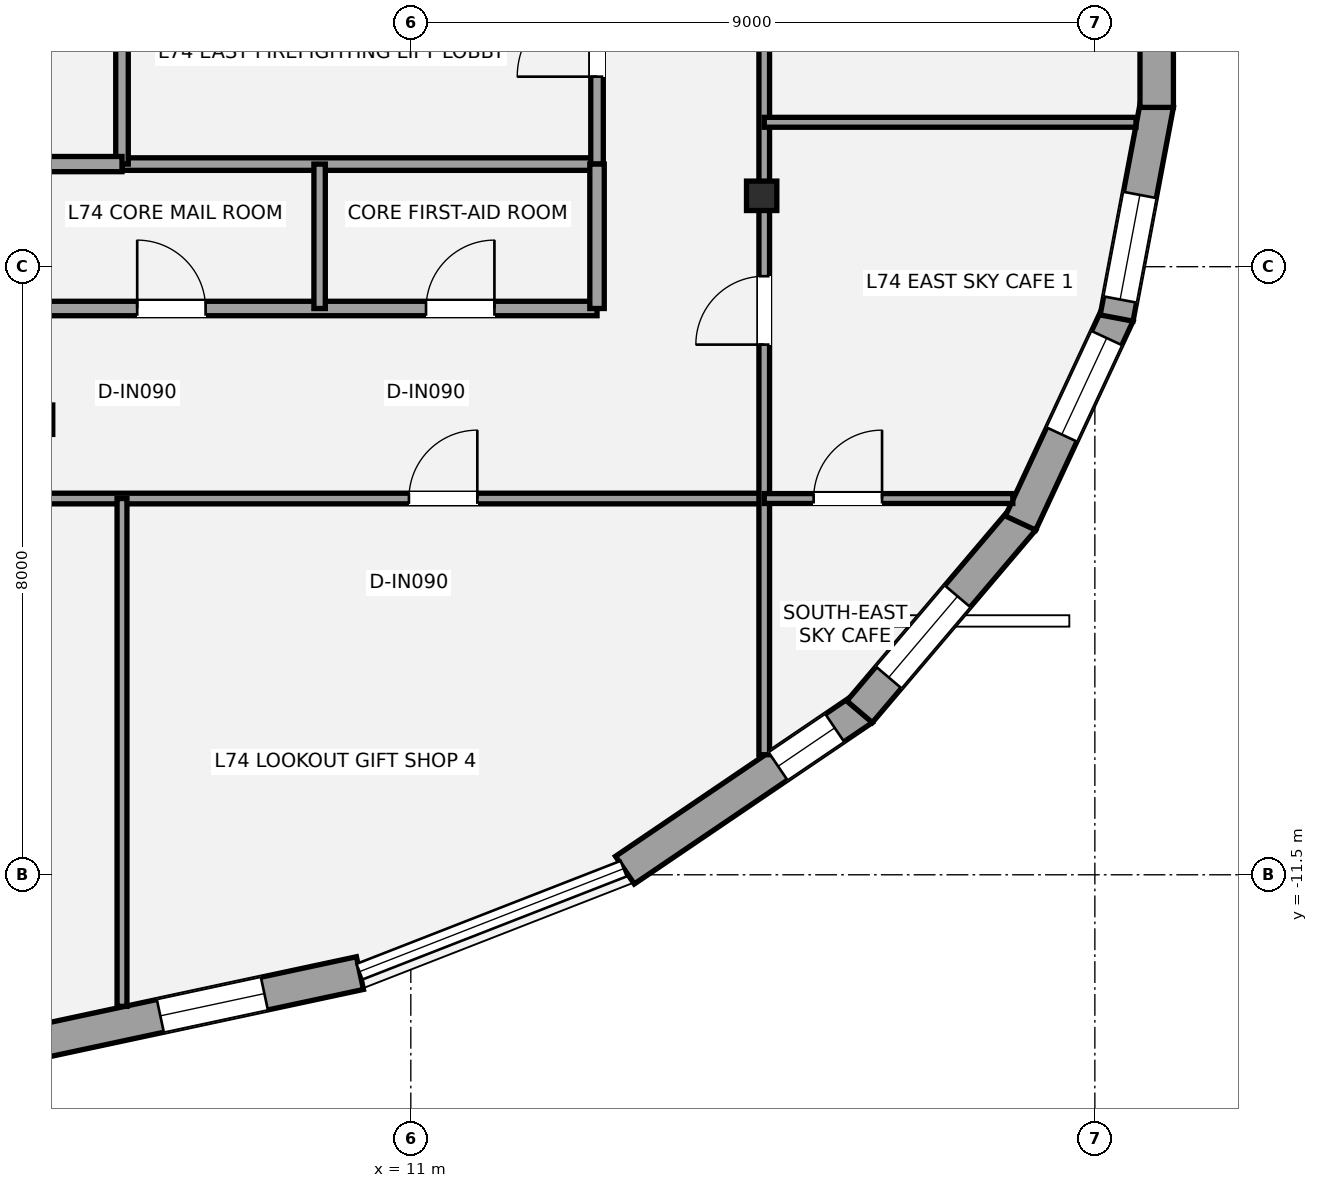
"""IFC4 building model, lengths in metres.
Left out: names, types, materials, properties, quantities, classifications, styles, units other than length and angle.
Written with IfcOpenShell. Run it as: python <this file> out.ifc"""

import sys

from ifc_helpers import new_model, si_unit, direction, frame, frame_2d, origin, origin_2d, place, context, subcontext, project, spatial, rectangle, i_section, extrude, element, fill, save


model = new_model("IFC4")
c1 = context("Model", 3, precision=1e-05, world=origin(), true_north=direction((0.0, 1.0)))
c2 = subcontext(c1, "Body", "Model", "MODEL_VIEW")
j1 = project(units=[si_unit("LENGTHUNIT", "METRE"), si_unit("PLANEANGLEUNIT", "RADIAN")], contexts=[c1])
p1 = place(None, origin())
s1 = spatial("IfcSite", under=j1, at=p1, CompositionType="ELEMENT")
p2 = place(p1, origin())
s2 = spatial("IfcBuilding", under=s1, at=p2, CompositionType="ELEMENT")
p3 = place(p2, frame((0.0, 0.0, 260.4)))
s3 = spatial("IfcBuildingStorey", under=s2, at=p3, CompositionType="ELEMENT", Elevation=260.4)
for number, where, z_axis, x_axis in (
    (1, (6.09, -5.513, 0.0), (0.0, 0.0, 1.0), (1.0, 0.0, 0.0)),
    (2, (15.616, -2.567, 0.0), (0.0, 0.0, 1.0), (1.0, 0.0, 0.0)),
):
    element("IfcColumn", number, at=place(p3, frame(where, z_axis=z_axis, x_axis=x_axis)), inside=s3, PredefinedType="COLUMN", context=c2, shape_type="SweptSolid", body=[
        extrude(i_section(OverallWidth=0.399, OverallDepth=0.387, WebThickness=0.021, FlangeThickness=0.033, at=origin_2d()), origin(), (0.0, 0.0, 1.0), 4.4),
    ])
p4 = place(p3, frame((10.331, -12.794, 0.0), z_axis=(0.0, 0.0, 1.0), x_axis=(-0.977823681193, -0.209429817596, 0.0)))
e3 = element("IfcWall", 3, at=p4, inside=s3, PredefinedType="STANDARD", context=c2, shape_type="SweptSolid", body=[
    extrude(rectangle(XDim=4.367, YDim=0.44, at=frame_2d((2.184, 0.0))), origin(), (0.0, 0.0, 1.0), 3.546),
])
p5 = place(p4, frame((1.286, 0.0, 0.6)))
e4 = element("IfcOpeningElement", 4, at=p5, cuts=e3, PredefinedType="OPENING", context=c2, shape_type="SweptSolid", body=[
    extrude(rectangle(XDim=1.4, YDim=1.55, at=frame_2d((0.7, 0.775))), frame((0.0, 0.23, 0.0), z_axis=(0.0, -1.0, 0.0), x_axis=(1.0, 0.0, 0.0)), (0.0, 0.0, 1.0), 0.46),
])
p6 = place(p3, frame((16.948, -9.316, 0.0), z_axis=(0.0, 0.0, 1.0), x_axis=(-0.827716626187, -0.561146314908, 0.0)))
e5 = element("IfcWall", 5, at=p6, inside=s3, PredefinedType="STANDARD", context=c2, shape_type="SweptSolid", body=[
    extrude(rectangle(XDim=3.783, YDim=0.44, at=frame_2d((1.892, 0.0))), origin(), (0.0, 0.0, 1.0), 3.55),
])
p7 = place(p6, frame((0.448, 0.0, 0.58)))
e6 = element("IfcOpeningElement", 6, at=p7, cuts=e5, PredefinedType="OPENING", context=c2, shape_type="SweptSolid", body=[
    extrude(rectangle(XDim=0.9, YDim=1.35, at=frame_2d((0.45, 0.675))), frame((0.0, 0.23, 0.0), z_axis=(0.0, -1.0, 0.0), x_axis=(1.0, 0.0, 0.0)), (0.0, 0.0, 1.0), 0.46),
])
p8 = place(p3, frame((19.054, -6.823, 0.0), z_axis=(0.0, 0.0, 1.0), x_axis=(-0.647061604266, -0.762437722233, 0.0)))
e7 = element("IfcWall", 7, at=p8, inside=s3, PredefinedType="STANDARD", context=c2, shape_type="SweptSolid", body=[
    extrude(rectangle(XDim=3.322, YDim=0.44, at=frame_2d((1.661, 0.0))), origin(), (0.0, 0.0, 1.0), 3.546),
])
p9 = place(p8, frame((1.329, 0.0, 0.58)))
e8 = element("IfcOpeningElement", 8, at=p9, cuts=e7, PredefinedType="OPENING", context=c2, shape_type="SweptSolid", body=[
    extrude(rectangle(XDim=1.4, YDim=1.55, at=frame_2d((0.7, 0.775))), frame((0.0, 0.23, 0.0), z_axis=(0.0, -1.0, 0.0), x_axis=(1.0, 0.0, 0.0)), (0.0, 0.0, 1.0), 0.46),
])
p10 = place(p3, frame((20.303, -4.123, 0.0), z_axis=(0.0, 0.0, 1.0), x_axis=(-0.422378607623, -0.906419501016, 0.0)))
e9 = element("IfcWall", 9, at=p10, inside=s3, PredefinedType="STANDARD", context=c2, shape_type="SweptSolid", body=[
    extrude(rectangle(XDim=3.033, YDim=0.44, at=frame_2d((1.517, 0.0))), origin(), (0.0, 0.0, 1.0), 3.546),
])
p11 = place(p10, frame((0.348, 0.0, 0.58)))
e10 = element("IfcOpeningElement", 10, at=p11, cuts=e9, PredefinedType="OPENING", context=c2, shape_type="SweptSolid", body=[
    extrude(rectangle(XDim=1.4, YDim=1.55, at=frame_2d((0.7, 0.775))), frame((0.0, 0.23, 0.0), z_axis=(0.0, -1.0, 0.0), x_axis=(1.0, 0.0, 0.0)), (0.0, 0.0, 1.0), 0.46),
])
p12 = place(p3, frame((20.817, -1.364, 0.0), z_axis=(0.0, 0.0, 1.0), x_axis=(-0.185555519657, -0.982633781795, 0.0)))
e11 = element("IfcWall", 11, at=p12, inside=s3, PredefinedType="STANDARD", context=c2, shape_type="SweptSolid", body=[
    extrude(rectangle(XDim=2.862, YDim=0.44, at=frame_2d((1.431, 0.0))), origin(), (0.0, 0.0, 1.0), 3.546),
])
p13 = place(p12, frame((1.213, 0.0, 0.6)))
e12 = element("IfcOpeningElement", 12, at=p13, cuts=e11, PredefinedType="OPENING", context=c2, shape_type="SweptSolid", body=[
    extrude(rectangle(XDim=1.4, YDim=1.55, at=frame_2d((0.7, 0.775))), frame((0.0, 0.23, 0.0), z_axis=(0.0, -1.0, 0.0), x_axis=(1.0, 0.0, 0.0)), (0.0, 0.0, 1.0), 0.46),
])
p14 = place(p3, frame((20.814, 1.404, 0.0), z_axis=(0.0, 0.0, 1.0), x_axis=(0.0, -1.0, 0.0)))
e13 = element("IfcWall", 13, at=p14, inside=s3, PredefinedType="STANDARD", context=c2, shape_type="SweptSolid", body=[
    extrude(rectangle(XDim=2.809, YDim=0.44, at=frame_2d((1.404, 0.0))), origin(), (0.0, 0.0, 1.0), 3.546),
])
p15 = place(p14, frame((0.2, 0.0, 0.58)))
e14 = element("IfcOpeningElement", 14, at=p15, cuts=e13, PredefinedType="OPENING", context=c2, shape_type="SweptSolid", body=[
    extrude(rectangle(XDim=1.4, YDim=1.55, at=frame_2d((0.7, 0.775))), frame((0.0, 0.23, 0.0), z_axis=(0.0, -1.0, 0.0), x_axis=(1.0, 0.0, 0.0)), (0.0, 0.0, 1.0), 0.46),
])
p16 = place(p3, frame((7.2, -2.15, 0.0), z_axis=(0.0, 0.0, 1.0), x_axis=(1.0, 0.0, 0.0)))
e15 = element("IfcWall", 15, at=p16, inside=s3, PredefinedType="PARTITIONING", context=c2, shape_type="SweptSolid", body=[
    extrude(rectangle(XDim=6.25, YDim=0.165, at=frame_2d((3.125, 0.0))), origin(), (0.0, 0.0, 1.0), 2.37),
])
p17 = place(p3, frame((7.2, -2.15, 0.0), z_axis=(0.0, 0.0, 1.0), x_axis=(0.0, 1.0, 0.0)))
e16 = element("IfcWall", 16, at=p17, inside=s3, PredefinedType="PARTITIONING", context=c2, shape_type="SweptSolid", body=[
    extrude(rectangle(XDim=3.5, YDim=0.165, at=frame_2d((1.75, 0.0))), origin(), (0.0, 0.0, 1.0), 2.37),
])
p18 = place(p3, frame((13.45, -2.15, 0.0), z_axis=(0.0, 0.0, 1.0), x_axis=(0.0, 1.0, 0.0)))
e17 = element("IfcWall", 17, at=p18, inside=s3, PredefinedType="PARTITIONING", context=c2, shape_type="SweptSolid", body=[
    extrude(rectangle(XDim=3.5, YDim=0.165, at=frame_2d((1.75, 0.0))), origin(), (0.0, 0.0, 1.0), 2.37),
])
p19 = place(p18, frame((1.15, 0.0, 0.0)))
e18 = element("IfcOpeningElement", 18, at=p19, cuts=e17, PredefinedType="OPENING", context=c2, shape_type="SweptSolid", body=[
    extrude(rectangle(XDim=1.05, YDim=2.15, at=frame_2d((0.525, 1.075))), frame((0.0, 0.093, 0.0), z_axis=(0.0, -1.0, 0.0), x_axis=(1.0, 0.0, 0.0)), (0.0, 0.0, 1.0), 0.185),
])
p20 = place(p3, frame((4.95, -2.15, 0.0), z_axis=(0.0, 0.0, 1.0), x_axis=(1.0, 0.0, 0.0)))
e19 = element("IfcWall", 19, at=p20, inside=s3, PredefinedType="SOLIDWALL", context=c2, shape_type="SweptSolid", body=[
    extrude(rectangle(XDim=2.25, YDim=0.2, at=frame_2d((1.125, 0.0))), origin(), (0.0, 0.0, 1.0), 2.37),
])
p21 = place(p3, frame((2.1, -4.05, 0.0), z_axis=(0.0, 0.0, 1.0), x_axis=(1.0, 0.0, 0.0)))
e20 = element("IfcWall", 20, at=p21, inside=s3, PredefinedType="PLUMBINGWALL", context=c2, shape_type="SweptSolid", body=[
    extrude(rectangle(XDim=11.35, YDim=0.19, at=frame_2d((5.675, 0.0))), origin(), (0.0, 0.0, 1.0), 2.37),
])
p22 = place(p21, frame((1.4, 0.0, 0.0)))
e21 = element("IfcOpeningElement", 21, at=p22, cuts=e20, PredefinedType="OPENING", context=c2, shape_type="SweptSolid", body=[
    extrude(rectangle(XDim=0.9, YDim=2.1, at=frame_2d((0.45, 1.05))), frame((0.0, 0.105, 0.0), z_axis=(0.0, -1.0, 0.0), x_axis=(1.0, 0.0, 0.0)), (0.0, 0.0, 1.0), 0.21),
])
p23 = place(p21, frame((5.3, 0.0, 0.0)))
e22 = element("IfcOpeningElement", 22, at=p23, cuts=e20, PredefinedType="OPENING", context=c2, shape_type="SweptSolid", body=[
    extrude(rectangle(XDim=0.9, YDim=2.1, at=frame_2d((0.45, 1.05))), frame((0.0, 0.105, 0.0), z_axis=(0.0, -1.0, 0.0), x_axis=(1.0, 0.0, 0.0)), (0.0, 0.0, 1.0), 0.21),
])
p24 = place(p21, frame((9.1, 0.0, 0.0)))
e23 = element("IfcOpeningElement", 23, at=p24, cuts=e20, PredefinedType="OPENING", context=c2, shape_type="SweptSolid", body=[
    extrude(rectangle(XDim=0.9, YDim=2.1, at=frame_2d((0.45, 1.05))), frame((0.0, 0.105, 0.0), z_axis=(0.0, -1.0, 0.0), x_axis=(1.0, 0.0, 0.0)), (0.0, 0.0, 1.0), 0.21),
])
p25 = place(p3, frame((13.45, -4.05, 0.0), z_axis=(0.0, 0.0, 1.0), x_axis=(0.0, 1.0, 0.0)))
e24 = element("IfcWall", 24, at=p25, inside=s3, PredefinedType="PLUMBINGWALL", context=c2, shape_type="SweptSolid", body=[
    extrude(rectangle(XDim=1.9, YDim=0.19, at=frame_2d((0.95, 0.0))), origin(), (0.0, 0.0, 1.0), 3.633),
])
p26 = place(p3, frame((9.8, -4.05, 0.0), z_axis=(0.0, 0.0, 1.0), x_axis=(0.0, 1.0, 0.0)))
e25 = element("IfcWall", 25, at=p26, inside=s3, PredefinedType="PLUMBINGWALL", context=c2, shape_type="SweptSolid", body=[
    extrude(rectangle(XDim=1.9, YDim=0.15, at=frame_2d((0.95, 0.0))), origin(), (0.0, 0.0, 1.0), 3.633),
])
p27 = place(p3, frame((-15.65, -6.55, 0.0), z_axis=(0.0, 0.0, 1.0), x_axis=(1.0, 0.0, 0.0)))
e26 = element("IfcWall", 26, at=p27, inside=s3, PredefinedType="PARTITIONING", context=c2, shape_type="SweptSolid", body=[
    extrude(rectangle(XDim=31.3, YDim=0.14, at=frame_2d((15.65, 0.0))), origin(), (0.0, 0.0, 1.0), 3.633),
])
p28 = place(p27, frame((3.775, 0.0, 0.0)))
e27 = element("IfcOpeningElement", 27, at=p28, cuts=e26, PredefinedType="OPENING", context=c2, shape_type="SweptSolid", body=[
    extrude(rectangle(XDim=0.9, YDim=2.1, at=frame_2d((0.45, 1.05))), frame((0.0, 0.08, 0.0), z_axis=(0.0, -1.0, 0.0), x_axis=(1.0, 0.0, 0.0)), (0.0, 0.0, 1.0), 0.16),
])
p29 = place(p27, frame((11.6, 0.0, 0.0)))
e28 = element("IfcOpeningElement", 28, at=p29, cuts=e26, PredefinedType="OPENING", context=c2, shape_type="SweptSolid", body=[
    extrude(rectangle(XDim=0.9, YDim=2.1, at=frame_2d((0.45, 1.05))), frame((0.0, 0.08, 0.0), z_axis=(0.0, -1.0, 0.0), x_axis=(1.0, 0.0, 0.0)), (0.0, 0.0, 1.0), 0.16),
])
p30 = place(p27, frame((18.5, 0.0, 0.0)))
e29 = element("IfcOpeningElement", 29, at=p30, cuts=e26, PredefinedType="OPENING", context=c2, shape_type="SweptSolid", body=[
    extrude(rectangle(XDim=1.5, YDim=2.15, at=frame_2d((0.75, 1.075))), frame((0.0, 0.08, 0.0), z_axis=(0.0, -1.0, 0.0), x_axis=(1.0, 0.0, 0.0)), (0.0, 0.0, 1.0), 0.16),
])
p31 = place(p27, frame((26.625, 0.0, 0.0)))
e30 = element("IfcOpeningElement", 30, at=p31, cuts=e26, PredefinedType="OPENING", context=c2, shape_type="SweptSolid", body=[
    extrude(rectangle(XDim=0.9, YDim=2.1, at=frame_2d((0.45, 1.05))), frame((0.0, 0.08, 0.0), z_axis=(0.0, -1.0, 0.0), x_axis=(1.0, 0.0, 0.0)), (0.0, 0.0, 1.0), 0.16),
])
p32 = place(p3, frame((15.65, -9.921, 0.0), z_axis=(0.0, 0.0, 1.0), x_axis=(0.0, 1.0, 0.0)))
e31 = element("IfcWall", 31, at=p32, inside=s3, PredefinedType="PARTITIONING", context=c2, shape_type="SweptSolid", body=[
    extrude(rectangle(XDim=12.321, YDim=0.14, at=frame_2d((6.16, 0.0))), origin(), (0.0, 0.0, 1.0), 2.37),
])
p33 = place(p32, frame((5.396, 0.0, 0.0)))
e32 = element("IfcOpeningElement", 32, at=p33, cuts=e31, PredefinedType="OPENING", context=c2, shape_type="SweptSolid", body=[
    extrude(rectangle(XDim=0.9, YDim=2.1, at=frame_2d((0.45, 1.05))), frame((0.0, 0.08, 0.0), z_axis=(0.0, -1.0, 0.0), x_axis=(1.0, 0.0, 0.0)), (0.0, 0.0, 1.0), 0.16),
])
p34 = place(p32, frame((10.231, 0.0, 0.0)))
e33 = element("IfcOpeningElement", 33, at=p34, cuts=e31, PredefinedType="OPENING", context=c2, shape_type="SweptSolid", body=[
    extrude(rectangle(XDim=0.9, YDim=2.1, at=frame_2d((0.45, 1.05))), frame((0.0, 0.08, 0.0), z_axis=(0.0, -1.0, 0.0), x_axis=(1.0, 0.0, 0.0)), (0.0, 0.0, 1.0), 0.16),
])
p35 = place(p3, frame((7.2, -13.231, 0.0), z_axis=(0.0, 0.0, 1.0), x_axis=(0.0, 1.0, 0.0)))
e34 = element("IfcWall", 34, at=p35, inside=s3, PredefinedType="PARTITIONING", context=c2, shape_type="SweptSolid", body=[
    extrude(rectangle(XDim=6.681, YDim=0.13, at=frame_2d((3.34, 0.0))), origin(), (0.0, 0.0, 1.0), 4.18),
])
p36 = place(p3, frame((15.65, -6.55, 0.0), z_axis=(0.0, 0.0, 1.0), x_axis=(1.0, 0.0, 0.0)))
e35 = element("IfcWall", 35, at=p36, inside=s3, PredefinedType="PARTITIONING", context=c2, shape_type="SweptSolid", body=[
    extrude(rectangle(XDim=3.271, YDim=0.13, at=frame_2d((1.635, 0.0))), origin(), (0.0, 0.0, 1.0), 4.18),
])
p37 = place(p36, frame((0.65, 0.0, 0.0)))
e36 = element("IfcOpeningElement", 36, at=p37, cuts=e35, PredefinedType="OPENING", context=c2, shape_type="SweptSolid", body=[
    extrude(rectangle(XDim=0.9, YDim=2.1, at=frame_2d((0.45, 1.05))), frame((0.0, 0.075, 0.0), z_axis=(0.0, -1.0, 0.0), x_axis=(1.0, 0.0, 0.0)), (0.0, 0.0, 1.0), 0.15),
])
p38 = place(p3, frame((15.65, -1.6, 0.0), z_axis=(0.0, 0.0, 1.0), x_axis=(1.0, 0.0, 0.0)))
e37 = element("IfcWall", 37, at=p38, inside=s3, PredefinedType="PARTITIONING", context=c2, shape_type="SweptSolid", body=[
    extrude(rectangle(XDim=4.891, YDim=0.13, at=frame_2d((2.445, 0.0))), origin(), (0.0, 0.0, 1.0), 3.633),
])
p39 = place(p5, origin())
e38 = element("IfcWindow", 38, at=p39, inside=s3, PartitioningType="SINGLE_PANEL", PredefinedType="WINDOW", context=c2, shape_type="SweptSolid", body=[
    extrude(rectangle(XDim=1.4, YDim=1.55, at=frame_2d((0.7, 0.775))), frame((0.0, -0.01, 0.0), z_axis=(0.0, -1.0, 0.0), x_axis=(1.0, 0.0, 0.0)), (0.0, 0.0, 1.0), 0.06),
])
fill(e4, e38)
p40 = place(p7, origin())
e39 = element("IfcWindow", 39, at=p40, inside=s3, PartitioningType="SINGLE_PANEL", PredefinedType="WINDOW", context=c2, shape_type="SweptSolid", body=[
    extrude(rectangle(XDim=0.9, YDim=1.35, at=frame_2d((0.45, 0.675))), frame((0.0, -0.01, 0.0), z_axis=(0.0, -1.0, 0.0), x_axis=(1.0, 0.0, 0.0)), (0.0, 0.0, 1.0), 0.06),
])
fill(e6, e39)
p41 = place(p9, origin())
e40 = element("IfcWindow", 40, at=p41, inside=s3, PartitioningType="SINGLE_PANEL", PredefinedType="WINDOW", context=c2, shape_type="SweptSolid", body=[
    extrude(rectangle(XDim=1.4, YDim=1.55, at=frame_2d((0.7, 0.775))), frame((0.0, -0.01, 0.0), z_axis=(0.0, -1.0, 0.0), x_axis=(1.0, 0.0, 0.0)), (0.0, 0.0, 1.0), 0.06),
])
fill(e8, e40)
p42 = place(p11, origin())
e41 = element("IfcWindow", 41, at=p42, inside=s3, PartitioningType="SINGLE_PANEL", PredefinedType="WINDOW", context=c2, shape_type="SweptSolid", body=[
    extrude(rectangle(XDim=1.4, YDim=1.55, at=frame_2d((0.7, 0.775))), frame((0.0, -0.01, 0.0), z_axis=(0.0, -1.0, 0.0), x_axis=(1.0, 0.0, 0.0)), (0.0, 0.0, 1.0), 0.06),
])
fill(e10, e41)
p43 = place(p13, origin())
e42 = element("IfcWindow", 42, at=p43, inside=s3, PartitioningType="SINGLE_PANEL", PredefinedType="WINDOW", context=c2, shape_type="SweptSolid", body=[
    extrude(rectangle(XDim=1.4, YDim=1.55, at=frame_2d((0.7, 0.775))), frame((0.0, -0.01, 0.0), z_axis=(0.0, -1.0, 0.0), x_axis=(1.0, 0.0, 0.0)), (0.0, 0.0, 1.0), 0.06),
])
fill(e12, e42)
p44 = place(p19, origin())
e43 = element("IfcDoor", 43, at=p44, inside=s3, OperationType="SINGLE_SWING_LEFT", PredefinedType="DOOR", context=c2, shape_type="SweptSolid", body=[
    extrude(rectangle(XDim=1.05, YDim=2.15, at=frame_2d((0.525, 1.075))), frame((0.0, 0.025, 0.0), z_axis=(0.0, -1.0, 0.0), x_axis=(1.0, 0.0, 0.0)), (0.0, 0.0, 1.0), 0.05),
])
fill(e18, e43)
p45 = place(p23, origin())
e44 = element("IfcDoor", 44, at=p45, inside=s3, OperationType="SINGLE_SWING_LEFT", PredefinedType="DOOR", context=c2, shape_type="SweptSolid", body=[
    extrude(rectangle(XDim=0.9, YDim=2.1, at=frame_2d((0.45, 1.05))), frame((0.0, 0.025, 0.0), z_axis=(0.0, -1.0, 0.0), x_axis=(1.0, 0.0, 0.0)), (0.0, 0.0, 1.0), 0.05),
])
fill(e22, e44)
p46 = place(p24, origin())
e45 = element("IfcDoor", 45, at=p46, inside=s3, OperationType="SINGLE_SWING_RIGHT", PredefinedType="DOOR", context=c2, shape_type="SweptSolid", body=[
    extrude(rectangle(XDim=0.9, YDim=2.1, at=frame_2d((0.45, 1.05))), frame((0.0, 0.025, 0.0), z_axis=(0.0, -1.0, 0.0), x_axis=(1.0, 0.0, 0.0)), (0.0, 0.0, 1.0), 0.05),
])
fill(e23, e45)
p47 = place(p31, origin())
e46 = element("IfcDoor", 46, at=p47, inside=s3, OperationType="SINGLE_SWING_RIGHT", PredefinedType="DOOR", context=c2, shape_type="SweptSolid", body=[
    extrude(rectangle(XDim=0.9, YDim=2.1, at=frame_2d((0.45, 1.05))), frame((0.0, 0.025, 0.0), z_axis=(0.0, -1.0, 0.0), x_axis=(1.0, 0.0, 0.0)), (0.0, 0.0, 1.0), 0.05),
])
fill(e30, e46)
p48 = place(p37, origin())
e47 = element("IfcDoor", 47, at=p48, inside=s3, OperationType="SINGLE_SWING_RIGHT", PredefinedType="DOOR", context=c2, shape_type="SweptSolid", body=[
    extrude(rectangle(XDim=0.9, YDim=2.1, at=frame_2d((0.45, 1.05))), frame((0.0, 0.025, 0.0), z_axis=(0.0, -1.0, 0.0), x_axis=(1.0, 0.0, 0.0)), (0.0, 0.0, 1.0), 0.05),
])
fill(e36, e47)
p49 = place(p33, origin())
e48 = element("IfcDoor", 48, at=p49, inside=s3, OperationType="SINGLE_SWING_LEFT", PredefinedType="DOOR", context=c2, shape_type="SweptSolid", body=[
    extrude(rectangle(XDim=0.9, YDim=2.1, at=frame_2d((0.45, 1.05))), frame((0.0, 0.025, 0.0), z_axis=(0.0, -1.0, 0.0), x_axis=(1.0, 0.0, 0.0)), (0.0, 0.0, 1.0), 0.05),
])
fill(e32, e48)
save(model, sys.argv[1])
